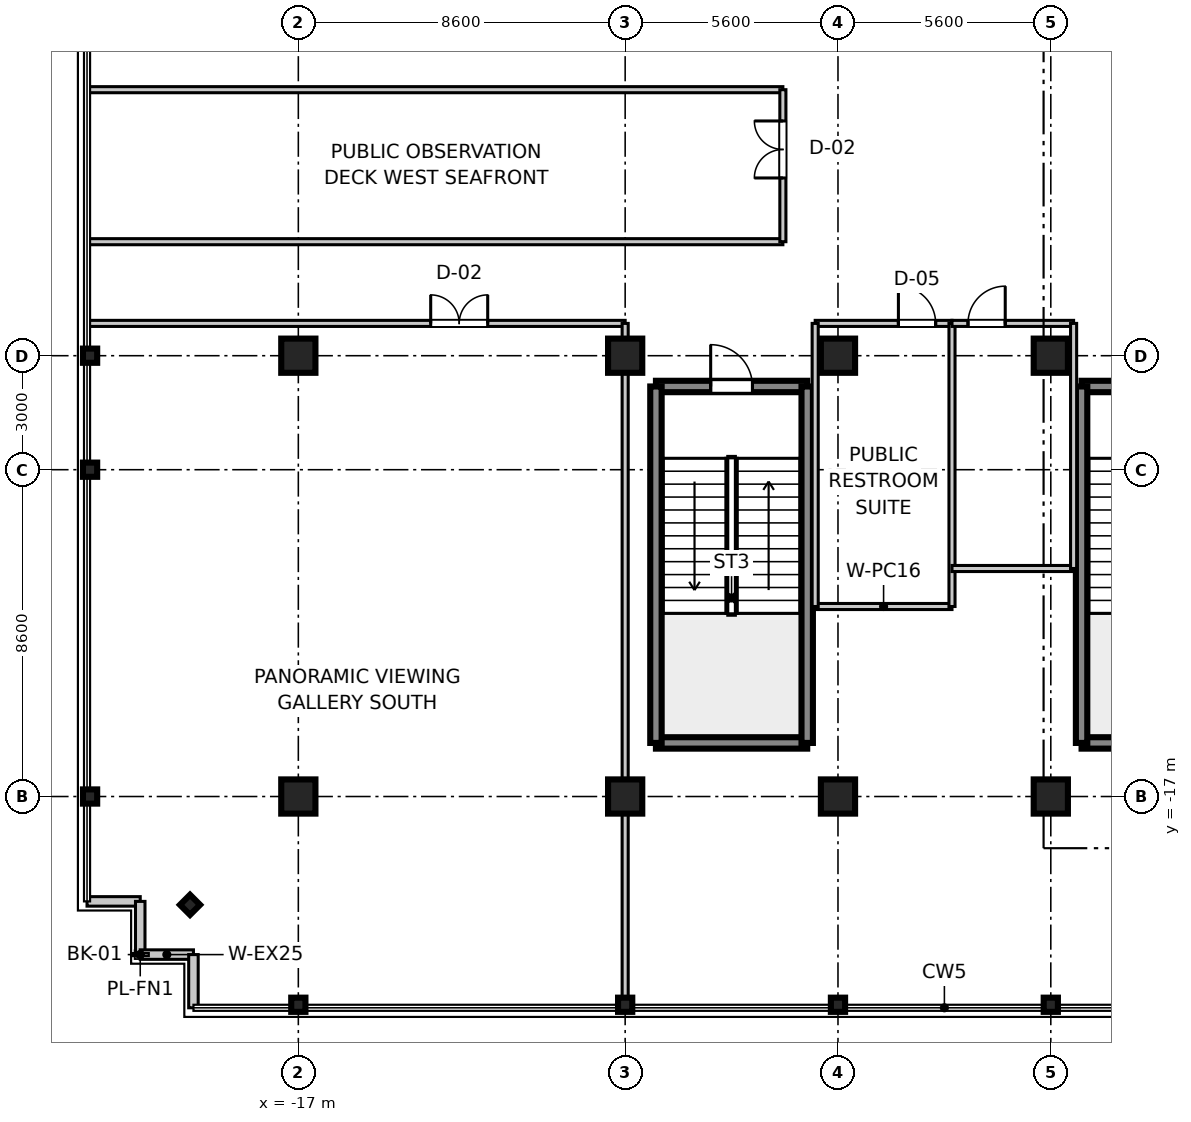
"""IFC4 building model, lengths in metres.
Left out: names, types, materials, properties, quantities, classifications, styles, units other than length and angle.
Written with IfcOpenShell. Run it as: python <this file> out.ifc"""

import sys

from ifc_helpers import new_model, si_unit, direction, frame, frame_2d, origin, origin_2d, place, context, subcontext, project, spatial, rectangle, i_section, extrude, source, transform, mapped, element, fill, save


model = new_model("IFC4")
c1 = context("Model", 3, precision=1e-05, world=origin(), true_north=direction((0.0, 1.0)))
c2 = subcontext(c1, "Body", "Model", "MODEL_VIEW")
j1 = project(units=[si_unit("LENGTHUNIT", "METRE"), si_unit("PLANEANGLEUNIT", "RADIAN")], contexts=[c1])
p1 = place(None, origin())
s1 = spatial("IfcSite", under=j1, at=p1, CompositionType="ELEMENT")
p2 = place(p1, origin())
s2 = spatial("IfcBuilding", under=s1, at=p2, CompositionType="ELEMENT")
p3 = place(p2, frame((0.0, 0.0, 343.05)))
s3 = spatial("IfcBuildingStorey", under=s2, at=p3, CompositionType="ELEMENT", Elevation=343.05)
m1 = source(origin(), c2, "Body", "SweptSolid", [
    extrude(rectangle(XDim=0.9, YDim=0.9, at=origin_2d()), origin(), (0.0, 0.0, 1.0), 4.455),
])
for number, where, z_axis, x_axis in (
    (1, (-17.0, -17.0, 0.0), (0.0, 0.0, 1.0), (1.0, 0.0, 0.0)),
    (2, (-17.0, -5.4, 0.0), (0.0, 0.0, 1.0), (1.0, 0.0, 0.0)),
    (3, (-8.4, -17.0, 0.0), (0.0, 0.0, 1.0), (1.0, 0.0, 0.0)),
    (4, (-8.4, -5.4, 0.0), (0.0, 0.0, 1.0), (1.0, 0.0, 0.0)),
    (5, (-2.8, -17.0, 0.0), (0.0, 0.0, 1.0), (1.0, 0.0, 0.0)),
    (6, (-2.8, -5.4, 0.0), (0.0, 0.0, 1.0), (1.0, 0.0, 0.0)),
    (7, (2.8, -17.0, 0.0), (0.0, 0.0, 1.0), (1.0, 0.0, 0.0)),
    (8, (2.8, -5.4, 0.0), (0.0, 0.0, 1.0), (1.0, 0.0, 0.0)),
):
    element("IfcColumn", number, at=place(p3, frame(where, z_axis=z_axis, x_axis=x_axis)), inside=s3, PredefinedType="COLUMN", context=c2, shape_type="MappedRepresentation", body=[
        mapped(m1, transform((0.0, 0.0, 0.0), scale=1.0)),
    ])
m2 = source(origin(), c2, "Body", "SweptSolid", [
    extrude(i_section(OverallWidth=0.374, OverallDepth=0.374, WebThickness=0.014, FlangeThickness=0.023, at=origin_2d()), origin(), (0.0, 0.0, 1.0), 4.455),
])
for number, where, z_axis, x_axis in (
    (9, (-22.48, -17.0, 0.0), (0.0, 0.0, 1.0), (1.0, 0.0, 0.0)),
    (10, (-22.48, -8.4, 0.0), (0.0, 0.0, 1.0), (1.0, 0.0, 0.0)),
    (11, (-22.48, -5.4, 0.0), (0.0, 0.0, 1.0), (1.0, 0.0, 0.0)),
    (12, (-17.0, -22.48, 0.0), (0.0, 0.0, 1.0), (0.0, 1.0, 0.0)),
    (13, (-8.4, -22.48, 0.0), (0.0, 0.0, 1.0), (0.0, 1.0, 0.0)),
    (14, (-2.8, -22.48, 0.0), (0.0, 0.0, 1.0), (0.0, 1.0, 0.0)),
    (15, (2.8, -22.48, 0.0), (0.0, 0.0, 1.0), (0.0, 1.0, 0.0)),
    (16, (-19.85, -19.85, 0.0), (0.0, 0.0, 1.0), (0.707, 0.707, 0.0)),
):
    element("IfcColumn", number, at=place(p3, frame(where, z_axis=z_axis, x_axis=x_axis)), inside=s3, PredefinedType="COLUMN", context=c2, shape_type="MappedRepresentation", body=[
        mapped(m2, transform((0.0, 0.0, 0.0), scale=1.0)),
    ])
m3 = source(origin(), c2, "Body", "SweptSolid", [
    extrude(rectangle(XDim=3.98, YDim=0.3, at=frame_2d((1.99, 0.0))), origin(), (0.0, 0.0, 1.0), 4.17),
])
for number, where, z_axis, x_axis in (
    (17, (3.61, -15.59, 0.0), (0.0, 0.0, 1.0), (1.0, 0.0, 0.0)),
    (18, (3.61, -6.21, 0.0), (0.0, 0.0, 1.0), (1.0, 0.0, 0.0)),
):
    element("IfcWall", number, at=place(p3, frame(where, z_axis=z_axis, x_axis=x_axis)), inside=s3, PredefinedType="SHEAR", context=c2, shape_type="MappedRepresentation", body=[
        mapped(m3, transform((0.0, 0.0, 0.0), scale=1.0)),
    ])
m4 = source(origin(), c2, "Body", "SweptSolid", [
    extrude(rectangle(XDim=9.38, YDim=0.3, at=frame_2d((4.69, 0.0))), origin(), (0.0, 0.0, 1.0), 4.17),
])
p4 = place(p3, frame((3.61, -15.59, 0.0), z_axis=(0.0, 0.0, 1.0), x_axis=(0.0, 1.0, 0.0)))
e19 = element("IfcWall", 19, at=p4, inside=s3, PredefinedType="SHEAR", context=c2, shape_type="MappedRepresentation", body=[
    mapped(m4, transform((0.0, 0.0, 0.0), scale=1.0)),
])
p5 = place(p3, frame((-7.59, -15.59, 0.0), z_axis=(0.0, 0.0, 1.0), x_axis=(1.0, 0.0, 0.0)))
e20 = element("IfcWall", 20, at=p5, inside=s3, PredefinedType="SHEAR", context=c2, shape_type="MappedRepresentation", body=[
    mapped(m3, transform((0.0, 0.0, 0.0), scale=1.0)),
])
p6 = place(p3, frame((-7.59, -6.21, 0.0), z_axis=(0.0, 0.0, 1.0), x_axis=(1.0, 0.0, 0.0)))
e21 = element("IfcWall", 21, at=p6, inside=s3, PredefinedType="SHEAR", context=c2, shape_type="MappedRepresentation", body=[
    mapped(m3, transform((0.0, 0.0, 0.0), scale=1.0)),
])
p7 = place(p6, frame((1.44, 0.0, 0.0)))
e22 = element("IfcOpeningElement", 22, at=p7, cuts=e21, PredefinedType="OPENING", context=c2, shape_type="SweptSolid", body=[
    extrude(rectangle(XDim=1.1, YDim=2.15, at=frame_2d((0.55, 1.075))), frame((0.0, 0.16, 0.0), z_axis=(0.0, -1.0, 0.0), x_axis=(1.0, 0.0, 0.0)), (0.0, 0.0, 1.0), 0.32),
])
for number, where, z_axis, x_axis in (
    (23, (-7.59, -15.59, 0.0), (0.0, 0.0, 1.0), (0.0, 1.0, 0.0)),
    (24, (-3.61, -15.59, 0.0), (0.0, 0.0, 1.0), (0.0, 1.0, 0.0)),
):
    element("IfcWall", number, at=place(p3, frame(where, z_axis=z_axis, x_axis=x_axis)), inside=s3, PredefinedType="SHEAR", context=c2, shape_type="MappedRepresentation", body=[
        mapped(m4, transform((0.0, 0.0, 0.0), scale=1.0)),
    ])
m5 = source(origin(), c2, "Body", "SweptSolid", [
    extrude(rectangle(XDim=1.4, YDim=0.25, at=frame_2d((0.7, 0.0))), origin(), (0.0, 0.0, 1.0), 4.17),
])
p8 = place(p3, frame((-22.56, -19.76, 0.0), z_axis=(0.0, 0.0, 1.0), x_axis=(1.0, 0.0, 0.0)))
e25 = element("IfcWall", 25, at=p8, inside=s3, PredefinedType="STANDARD", context=c2, shape_type="MappedRepresentation", body=[
    mapped(m5, transform((0.0, 0.0, 0.0), scale=1.0)),
])
m6 = source(origin(), c2, "Body", "SweptSolid", [
    extrude(rectangle(XDim=1.4, YDim=0.25, at=frame_2d((0.7, 0.0))), origin(), (0.0, 0.0, 1.0), 4.17),
])
for number, where, z_axis, x_axis in (
    (26, (-21.16, -21.16, 0.0), (0.0, 0.0, 1.0), (0.0, 1.0, 0.0)),
    (27, (-21.16, -21.16, 0.0), (0.0, 0.0, 1.0), (1.0, 0.0, 0.0)),
):
    element("IfcWall", number, at=place(p3, frame(where, z_axis=z_axis, x_axis=x_axis)), inside=s3, PredefinedType="STANDARD", context=c2, shape_type="MappedRepresentation", body=[
        mapped(m6, transform((0.0, 0.0, 0.0), scale=1.0)),
    ])
p9 = place(p3, frame((-19.76, -22.56, 0.0), z_axis=(0.0, 0.0, 1.0), x_axis=(0.0, 1.0, 0.0)))
e28 = element("IfcWall", 28, at=p9, inside=s3, PredefinedType="STANDARD", context=c2, shape_type="MappedRepresentation", body=[
    mapped(m5, transform((0.0, 0.0, 0.0), scale=1.0)),
])
m7 = source(origin(), c2, "Body", "SweptSolid", [
    extrude(rectangle(XDim=18.25, YDim=0.16, at=frame_2d((9.125, 0.0))), origin(), (0.0, 0.0, 1.0), 3.4),
])
for number, where, z_axis, x_axis in (
    (29, (-22.5, -2.4, 0.0), (0.0, 0.0, 1.0), (1.0, 0.0, 0.0)),
    (30, (-22.5, 1.6, 0.0), (0.0, 0.0, 1.0), (1.0, 0.0, 0.0)),
):
    element("IfcWall", number, at=place(p3, frame(where, z_axis=z_axis, x_axis=x_axis)), inside=s3, PredefinedType="PARTITIONING", context=c2, shape_type="MappedRepresentation", body=[
        mapped(m7, transform((0.0, 0.0, 0.0), scale=1.0)),
    ])
m8 = source(origin(), c2, "Body", "SweptSolid", [
    extrude(rectangle(XDim=4.0, YDim=0.16, at=frame_2d((2.0, 0.0))), origin(), (0.0, 0.0, 1.0), 3.4),
])
p10 = place(p3, frame((-4.25, -2.4, 0.0), z_axis=(0.0, 0.0, 1.0), x_axis=(0.0, 1.0, 0.0)))
e31 = element("IfcWall", 31, at=p10, inside=s3, PredefinedType="PARTITIONING", context=c2, shape_type="MappedRepresentation", body=[
    mapped(m8, transform((0.0, 0.0, 0.0), scale=1.0)),
])
p11 = place(p10, frame((1.677, 0.0, 0.0)))
e32 = element("IfcOpeningElement", 32, at=p11, cuts=e31, PredefinedType="OPENING", context=c2, shape_type="SweptSolid", body=[
    extrude(rectangle(XDim=1.5, YDim=2.15, at=frame_2d((0.75, 1.075))), frame((0.0, 0.09, 0.0), z_axis=(0.0, -1.0, 0.0), x_axis=(1.0, 0.0, 0.0)), (0.0, 0.0, 1.0), 0.18),
])
m9 = source(origin(), c2, "Body", "SweptSolid", [
    extrude(rectangle(XDim=14.1, YDim=0.16, at=frame_2d((7.05, 0.0))), origin(), (0.0, 0.0, 1.0), 3.4),
])
p12 = place(p3, frame((-22.5, -4.55, 0.0), z_axis=(0.0, 0.0, 1.0), x_axis=(1.0, 0.0, 0.0)))
e33 = element("IfcWall", 33, at=p12, inside=s3, PredefinedType="PARTITIONING", context=c2, shape_type="MappedRepresentation", body=[
    mapped(m9, transform((0.0, 0.0, 0.0), scale=1.0)),
])
p13 = place(p12, frame((8.983, 0.0, 0.0)))
e34 = element("IfcOpeningElement", 34, at=p13, cuts=e33, PredefinedType="OPENING", context=c2, shape_type="SweptSolid", body=[
    extrude(rectangle(XDim=1.5, YDim=2.15, at=frame_2d((0.75, 1.075))), frame((0.0, 0.09, 0.0), z_axis=(0.0, -1.0, 0.0), x_axis=(1.0, 0.0, 0.0)), (0.0, 0.0, 1.0), 0.18),
])
m10 = source(origin(), c2, "Body", "SweptSolid", [
    extrude(rectangle(XDim=17.95, YDim=0.16, at=frame_2d((8.975, 0.0))), origin(), (0.0, 0.0, 1.0), 3.4),
])
p14 = place(p3, frame((-8.4, -22.5, 0.0), z_axis=(0.0, 0.0, 1.0), x_axis=(0.0, 1.0, 0.0)))
e35 = element("IfcWall", 35, at=p14, inside=s3, PredefinedType="PARTITIONING", context=c2, shape_type="MappedRepresentation", body=[
    mapped(m10, transform((0.0, 0.0, 0.0), scale=1.0)),
])
m11 = source(origin(), c2, "Body", "SweptSolid", [
    extrude(rectangle(XDim=3.6, YDim=0.16, at=frame_2d((1.8, 0.0))), origin(), (0.0, 0.0, 1.0), 3.4),
])
p15 = place(p3, frame((-3.4, -12.0, 0.0), z_axis=(0.0, 0.0, 1.0), x_axis=(1.0, 0.0, 0.0)))
e36 = element("IfcWall", 36, at=p15, inside=s3, PredefinedType="PARTITIONING", context=c2, shape_type="MappedRepresentation", body=[
    mapped(m11, transform((0.0, 0.0, 0.0), scale=1.0)),
])
p16 = place(p3, frame((-3.4, -4.55, 0.0), z_axis=(0.0, 0.0, 1.0), x_axis=(1.0, 0.0, 0.0)))
e37 = element("IfcWall", 37, at=p16, inside=s3, PredefinedType="PARTITIONING", context=c2, shape_type="MappedRepresentation", body=[
    mapped(m11, transform((0.0, 0.0, 0.0), scale=1.0)),
])
p17 = place(p16, frame((2.19, 0.0, 0.0)))
e38 = element("IfcOpeningElement", 38, at=p17, cuts=e37, PredefinedType="OPENING", context=c2, shape_type="SweptSolid", body=[
    extrude(rectangle(XDim=0.98, YDim=2.1, at=frame_2d((0.49, 1.05))), frame((0.0, 0.09, 0.0), z_axis=(0.0, -1.0, 0.0), x_axis=(1.0, 0.0, 0.0)), (0.0, 0.0, 1.0), 0.18),
])
m12 = source(origin(), c2, "Body", "SweptSolid", [
    extrude(rectangle(XDim=7.45, YDim=0.16, at=frame_2d((3.725, 0.0))), origin(), (0.0, 0.0, 1.0), 3.4),
])
for number, where, z_axis, x_axis in (
    (39, (-3.4, -12.0, 0.0), (0.0, 0.0, 1.0), (0.0, 1.0, 0.0)),
    (40, (0.2, -12.0, 0.0), (0.0, 0.0, 1.0), (0.0, 1.0, 0.0)),
):
    element("IfcWall", number, at=place(p3, frame(where, z_axis=z_axis, x_axis=x_axis)), inside=s3, PredefinedType="PARTITIONING", context=c2, shape_type="MappedRepresentation", body=[
        mapped(m12, transform((0.0, 0.0, 0.0), scale=1.0)),
    ])
m13 = source(origin(), c2, "Body", "SweptSolid", [
    extrude(rectangle(XDim=3.2, YDim=0.16, at=frame_2d((1.6, 0.0))), origin(), (0.0, 0.0, 1.0), 3.4),
])
p18 = place(p3, frame((0.2, -11.0, 0.0), z_axis=(0.0, 0.0, 1.0), x_axis=(1.0, 0.0, 0.0)))
e41 = element("IfcWall", 41, at=p18, inside=s3, PredefinedType="PARTITIONING", context=c2, shape_type="MappedRepresentation", body=[
    mapped(m13, transform((0.0, 0.0, 0.0), scale=1.0)),
])
p19 = place(p3, frame((0.2, -4.55, 0.0), z_axis=(0.0, 0.0, 1.0), x_axis=(1.0, 0.0, 0.0)))
e42 = element("IfcWall", 42, at=p19, inside=s3, PredefinedType="PARTITIONING", context=c2, shape_type="MappedRepresentation", body=[
    mapped(m13, transform((0.0, 0.0, 0.0), scale=1.0)),
])
p20 = place(p19, frame((0.421, 0.0, 0.0)))
e43 = element("IfcOpeningElement", 43, at=p20, cuts=e42, PredefinedType="OPENING", context=c2, shape_type="SweptSolid", body=[
    extrude(rectangle(XDim=0.98, YDim=2.1, at=frame_2d((0.49, 1.05))), frame((0.0, 0.09, 0.0), z_axis=(0.0, -1.0, 0.0), x_axis=(1.0, 0.0, 0.0)), (0.0, 0.0, 1.0), 0.18),
])
m14 = source(origin(), c2, "Body", "SweptSolid", [
    extrude(rectangle(XDim=6.45, YDim=0.16, at=frame_2d((3.225, 0.0))), origin(), (0.0, 0.0, 1.0), 3.4),
])
p21 = place(p3, frame((3.4, -11.0, 0.0), z_axis=(0.0, 0.0, 1.0), x_axis=(0.0, 1.0, 0.0)))
e44 = element("IfcWall", 44, at=p21, inside=s3, PredefinedType="PARTITIONING", context=c2, shape_type="MappedRepresentation", body=[
    mapped(m14, transform((0.0, 0.0, 0.0), scale=1.0)),
])
m15 = source(origin(), c2, "Body", "SweptSolid", [
    extrude(rectangle(XDim=1.1, YDim=2.15, at=frame_2d((0.55, 1.075))), frame((0.0, 0.025, 0.0), z_axis=(0.0, -1.0, 0.0), x_axis=(1.0, 0.0, 0.0)), (0.0, 0.0, 1.0), 0.05),
])
p22 = place(p7, frame((1.1, 0.0, 0.0), z_axis=(0.0, 0.0, 1.0), x_axis=(-1.0, 0.0, 0.0)))
e45 = element("IfcDoor", 45, at=p22, inside=s3, OperationType="SINGLE_SWING_LEFT", PredefinedType="DOOR", context=c2, shape_type="MappedRepresentation", body=[
    mapped(m15, transform((0.0, 0.0, 0.0), scale=1.0)),
])
fill(e22, e45)
m16 = source(origin(), c2, "Body", "SweptSolid", [
    extrude(rectangle(XDim=1.5, YDim=2.15, at=frame_2d((0.75, 1.075))), frame((0.0, 0.025, 0.0), z_axis=(0.0, -1.0, 0.0), x_axis=(1.0, 0.0, 0.0)), (0.0, 0.0, 1.0), 0.05),
])
p23 = place(p11, origin())
e46 = element("IfcDoor", 46, at=p23, inside=s3, OperationType="DOUBLE_DOOR_SINGLE_SWING", PredefinedType="DOOR", context=c2, shape_type="MappedRepresentation", body=[
    mapped(m16, transform((0.0, 0.0, 0.0), scale=1.0)),
])
fill(e32, e46)
p24 = place(p13, frame((1.5, 0.0, 0.0), z_axis=(0.0, 0.0, 1.0), x_axis=(-1.0, 0.0, 0.0)))
e47 = element("IfcDoor", 47, at=p24, inside=s3, OperationType="DOUBLE_DOOR_SINGLE_SWING", PredefinedType="DOOR", context=c2, shape_type="MappedRepresentation", body=[
    mapped(m16, transform((0.0, 0.0, 0.0), scale=1.0)),
])
fill(e34, e47)
m17 = source(origin(), c2, "Body", "SweptSolid", [
    extrude(rectangle(XDim=0.98, YDim=2.1, at=frame_2d((0.49, 1.05))), frame((0.0, 0.025, 0.0), z_axis=(0.0, -1.0, 0.0), x_axis=(1.0, 0.0, 0.0)), (0.0, 0.0, 1.0), 0.05),
])
p25 = place(p17, frame((0.98, 0.0, 0.0), z_axis=(0.0, 0.0, 1.0), x_axis=(-1.0, 0.0, 0.0)))
e48 = element("IfcDoor", 48, at=p25, inside=s3, OperationType="SINGLE_SWING_LEFT", PredefinedType="DOOR", context=c2, shape_type="MappedRepresentation", body=[
    mapped(m17, transform((0.0, 0.0, 0.0), scale=1.0)),
])
fill(e38, e48)
p26 = place(p20, frame((0.98, 0.0, 0.0), z_axis=(0.0, 0.0, 1.0), x_axis=(-1.0, 0.0, 0.0)))
e49 = element("IfcDoor", 49, at=p26, inside=s3, OperationType="SINGLE_SWING_RIGHT", PredefinedType="DOOR", context=c2, shape_type="MappedRepresentation", body=[
    mapped(m17, transform((0.0, 0.0, 0.0), scale=1.0)),
])
fill(e43, e49)
save(model, sys.argv[1])
